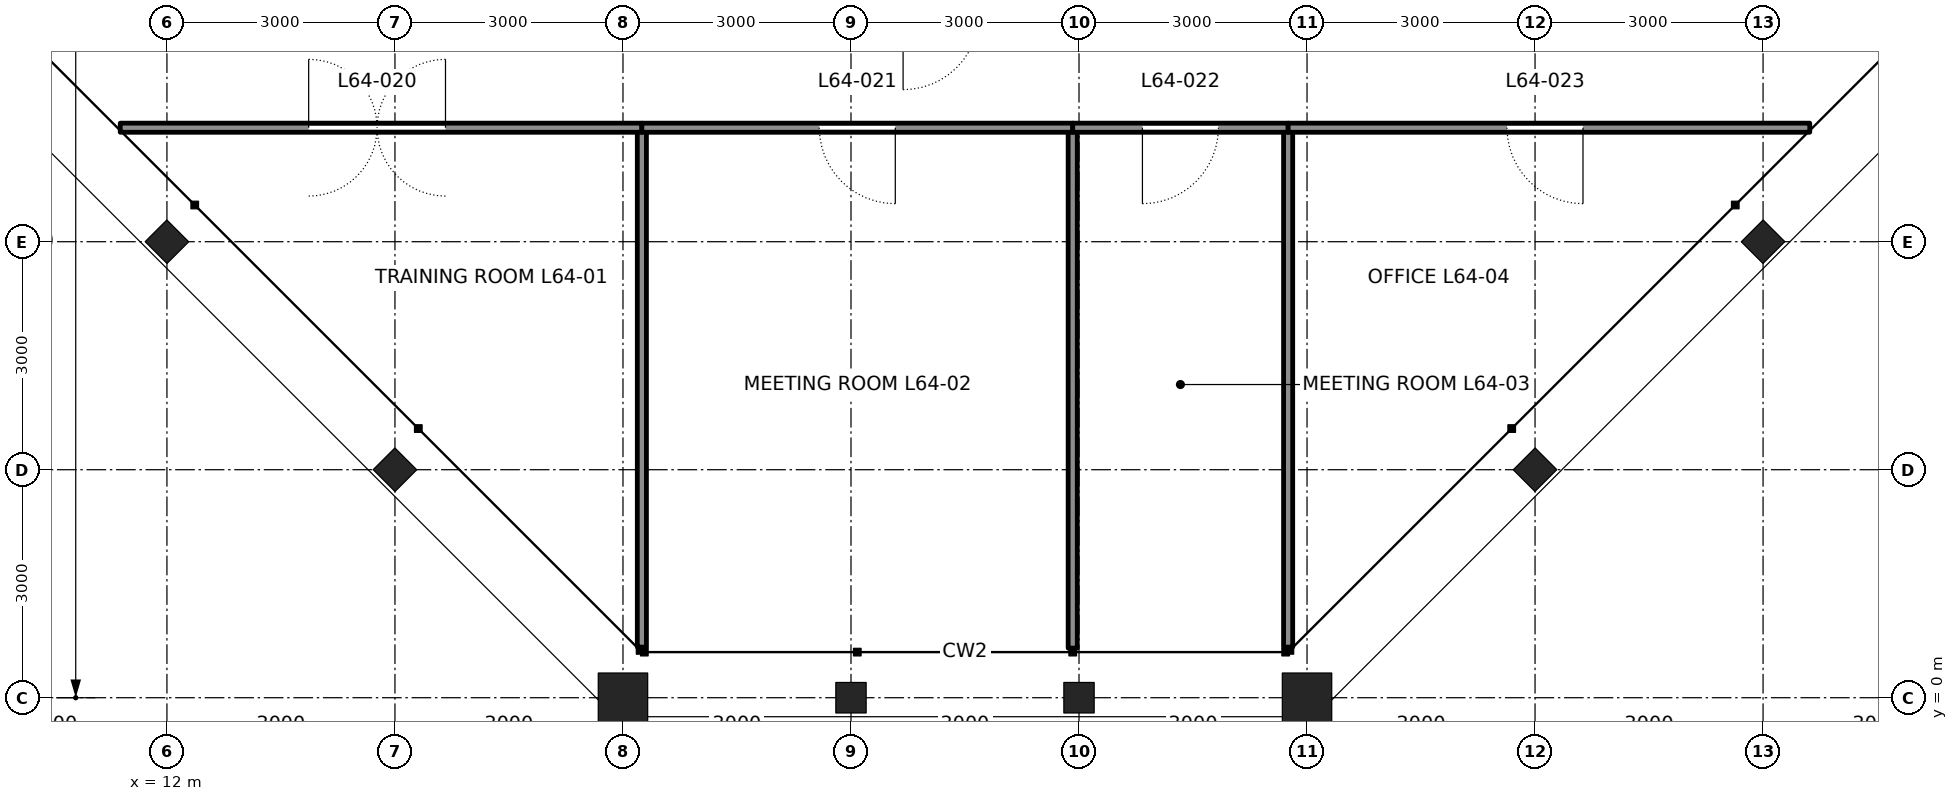
"""IFC4 building model, lengths in metres.
Left out: names, types, materials, properties, quantities, classifications, styles, units other than length and angle.
Written with IfcOpenShell. Run it as: python <this file> out.ifc"""

import sys

from ifc_helpers import new_model, si_unit, direction, frame, frame_2d, origin, origin_2d, place, context, subcontext, project, spatial, rectangle, hollow_rectangle, i_section, extrude, element, fill, save


model = new_model("IFC4")
c1 = context("Model", 3, precision=1e-05, world=origin(), true_north=direction((0.0, 1.0)))
c2 = subcontext(c1, "Body", "Model", "MODEL_VIEW")
j1 = project(units=[si_unit("LENGTHUNIT", "METRE"), si_unit("PLANEANGLEUNIT", "RADIAN")], contexts=[c1])
p1 = place(None, origin())
s1 = spatial("IfcSite", under=j1, at=p1, CompositionType="ELEMENT")
p2 = place(p1, origin())
s2 = spatial("IfcBuilding", under=s1, at=p2, CompositionType="ELEMENT")
p3 = place(p2, frame((0.0, 0.0, 287.4)))
s3 = spatial("IfcBuildingStorey", under=s2, at=p3, CompositionType="ELEMENT", Elevation=287.4)
p4 = place(p3, frame((18.0, 0.0, 0.0), z_axis=(0.0, 0.0, 1.0), x_axis=(0.0, -1.0, 0.0)))
e1 = element("IfcColumn", 1, at=p4, inside=s3, PredefinedType="COLUMN", context=c2, shape_type="SweptSolid", body=[
    extrude(hollow_rectangle(XDim=0.65, YDim=0.65, WallThickness=0.065, at=origin_2d()), origin(), (0.0, 0.0, 1.0), 4.2),
])
for number, where, z_axis, x_axis in (
    (2, (21.0, 0.0, 0.0), (0.0, 0.0, 1.0), (0.0, -1.0, 0.0)),
    (3, (24.0, 0.0, 0.0), (0.0, 0.0, 1.0), (0.0, -1.0, 0.0)),
):
    element("IfcColumn", number, at=place(p3, frame(where, z_axis=z_axis, x_axis=x_axis)), inside=s3, PredefinedType="COLUMN", context=c2, shape_type="SweptSolid", body=[
        extrude(i_section(OverallWidth=0.401, OverallDepth=0.399, WebThickness=0.025, FlangeThickness=0.04, at=origin_2d()), origin(), (0.0, 0.0, 1.0), 4.2),
    ])
p5 = place(p3, frame((27.0, 0.0, 0.0), z_axis=(0.0, 0.0, 1.0), x_axis=(0.0, -1.0, 0.0)))
e4 = element("IfcColumn", 4, at=p5, inside=s3, PredefinedType="COLUMN", context=c2, shape_type="SweptSolid", body=[
    extrude(hollow_rectangle(XDim=0.65, YDim=0.65, WallThickness=0.065, at=origin_2d()), origin(), (0.0, 0.0, 1.0), 4.2),
])
for number, where, z_axis, x_axis in (
    (5, (30.0, 3.0, 0.0), (0.0, 0.0, 1.0), (0.707, -0.707, 0.0)),
    (6, (33.0, 6.0, 0.0), (0.0, 0.0, 1.0), (0.707, -0.707, 0.0)),
    (7, (12.0, 6.0, 0.0), (0.0, 0.0, 1.0), (-0.707, -0.707, 0.0)),
    (8, (15.0, 3.0, 0.0), (0.0, 0.0, 1.0), (-0.707, -0.707, 0.0)),
):
    element("IfcColumn", number, at=place(p3, frame(where, z_axis=z_axis, x_axis=x_axis)), inside=s3, PredefinedType="COLUMN", context=c2, shape_type="SweptSolid", body=[
        extrude(i_section(OverallWidth=0.404, OverallDepth=0.406, WebThickness=0.027, FlangeThickness=0.044, at=origin_2d()), origin(), (0.0, 0.0, 1.0), 4.2),
    ])
p6 = place(p3, frame((18.249, 0.666, 0.0), z_axis=(0.0, 0.0, 1.0), x_axis=(0.0, 1.0, 0.0)))
e9 = element("IfcWall", 9, at=p6, inside=s3, PredefinedType="PARTITIONING", context=c2, shape_type="SweptSolid", body=[
    extrude(rectangle(XDim=6.834, YDim=0.12, at=frame_2d((3.417, 0.0))), origin(), (0.0, 0.0, 1.0), 4.04),
])
p7 = place(p3, frame((23.917, 0.653, 0.0), z_axis=(0.0, 0.0, 1.0), x_axis=(0.0, 1.0, 0.0)))
e10 = element("IfcWall", 10, at=p7, inside=s3, PredefinedType="PARTITIONING", context=c2, shape_type="SweptSolid", body=[
    extrude(rectangle(XDim=6.847, YDim=0.12, at=frame_2d((3.424, 0.0))), origin(), (0.0, 0.0, 1.0), 3.357),
])
p8 = place(p3, frame((26.751, 0.666, 0.0), z_axis=(0.0, 0.0, 1.0), x_axis=(0.0, 1.0, 0.0)))
e11 = element("IfcWall", 11, at=p8, inside=s3, PredefinedType="PARTITIONING", context=c2, shape_type="SweptSolid", body=[
    extrude(rectangle(XDim=6.834, YDim=0.12, at=frame_2d((3.417, 0.0))), origin(), (0.0, 0.0, 1.0), 4.04),
])
p9 = place(p3, frame((11.385, 7.5, 0.0), z_axis=(0.0, 0.0, 1.0), x_axis=(1.0, 0.0, 0.0)))
e12 = element("IfcWall", 12, at=p9, inside=s3, PredefinedType="PARTITIONING", context=c2, shape_type="SweptSolid", body=[
    extrude(rectangle(XDim=6.863, YDim=0.12, at=frame_2d((3.432, 0.0))), origin(), (0.0, 0.0, 1.0), 4.04),
])
p10 = place(p9, frame((2.479, 0.0, 0.0)))
e13 = element("IfcOpeningElement", 13, at=p10, cuts=e12, PredefinedType="OPENING", context=c2, shape_type="SweptSolid", body=[
    extrude(rectangle(XDim=1.8, YDim=2.4, at=frame_2d((0.9, 1.2))), frame((0.0, 0.07, 0.0), z_axis=(0.0, -1.0, 0.0), x_axis=(1.0, 0.0, 0.0)), (0.0, 0.0, 1.0), 0.14),
])
p11 = place(p3, frame((18.249, 7.5, 0.0), z_axis=(0.0, 0.0, 1.0), x_axis=(1.0, 0.0, 0.0)))
e14 = element("IfcWall", 14, at=p11, inside=s3, PredefinedType="PARTITIONING", context=c2, shape_type="SweptSolid", body=[
    extrude(rectangle(XDim=5.669, YDim=0.12, at=frame_2d((2.834, 0.0))), origin(), (0.0, 0.0, 1.0), 4.04),
])
p12 = place(p11, frame((2.334, 0.0, 0.0)))
e15 = element("IfcOpeningElement", 15, at=p12, cuts=e14, PredefinedType="OPENING", context=c2, shape_type="SweptSolid", body=[
    extrude(rectangle(XDim=1.0, YDim=2.4, at=frame_2d((0.5, 1.2))), frame((0.0, 0.07, 0.0), z_axis=(0.0, -1.0, 0.0), x_axis=(1.0, 0.0, 0.0)), (0.0, 0.0, 1.0), 0.14),
])
p13 = place(p3, frame((23.917, 7.5, 0.0), z_axis=(0.0, 0.0, 1.0), x_axis=(1.0, 0.0, 0.0)))
e16 = element("IfcWall", 16, at=p13, inside=s3, PredefinedType="PARTITIONING", context=c2, shape_type="SweptSolid", body=[
    extrude(rectangle(XDim=2.834, YDim=0.12, at=frame_2d((1.417, 0.0))), origin(), (0.0, 0.0, 1.0), 4.04),
])
p14 = place(p13, frame((0.917, 0.0, 0.0)))
e17 = element("IfcOpeningElement", 17, at=p14, cuts=e16, PredefinedType="OPENING", context=c2, shape_type="SweptSolid", body=[
    extrude(rectangle(XDim=1.0, YDim=2.4, at=frame_2d((0.5, 1.2))), frame((0.0, 0.07, 0.0), z_axis=(0.0, -1.0, 0.0), x_axis=(1.0, 0.0, 0.0)), (0.0, 0.0, 1.0), 0.14),
])
p15 = place(p3, frame((26.751, 7.5, 0.0), z_axis=(0.0, 0.0, 1.0), x_axis=(1.0, 0.0, 0.0)))
e18 = element("IfcWall", 18, at=p15, inside=s3, PredefinedType="PARTITIONING", context=c2, shape_type="SweptSolid", body=[
    extrude(rectangle(XDim=6.863, YDim=0.12, at=frame_2d((3.432, 0.0))), origin(), (0.0, 0.0, 1.0), 4.04),
])
p16 = place(p15, frame((2.879, 0.0, 0.0)))
e19 = element("IfcOpeningElement", 19, at=p16, cuts=e18, PredefinedType="OPENING", context=c2, shape_type="SweptSolid", body=[
    extrude(rectangle(XDim=1.0, YDim=2.4, at=frame_2d((0.5, 1.2))), frame((0.0, 0.07, 0.0), z_axis=(0.0, -1.0, 0.0), x_axis=(1.0, 0.0, 0.0)), (0.0, 0.0, 1.0), 0.14),
])
p17 = place(p10, origin())
e20 = element("IfcDoor", 20, at=p17, inside=s3, OperationType="DOUBLE_DOOR_DOUBLE_SWING", PredefinedType="DOOR", context=c2, shape_type="SweptSolid", body=[
    extrude(rectangle(XDim=1.8, YDim=2.4, at=frame_2d((0.9, 1.2))), frame((0.0, 0.025, 0.0), z_axis=(0.0, -1.0, 0.0), x_axis=(1.0, 0.0, 0.0)), (0.0, 0.0, 1.0), 0.05),
])
fill(e13, e20)
p18 = place(p12, frame((1.0, 0.0, 0.0), z_axis=(0.0, 0.0, 1.0), x_axis=(-1.0, 0.0, 0.0)))
e21 = element("IfcDoor", 21, at=p18, inside=s3, OperationType="SINGLE_SWING_LEFT", PredefinedType="DOOR", context=c2, shape_type="SweptSolid", body=[
    extrude(rectangle(XDim=1.0, YDim=2.4, at=frame_2d((0.5, 1.2))), frame((0.0, 0.025, 0.0), z_axis=(0.0, -1.0, 0.0), x_axis=(1.0, 0.0, 0.0)), (0.0, 0.0, 1.0), 0.05),
])
fill(e15, e21)
p19 = place(p14, frame((1.0, 0.0, 0.0), z_axis=(0.0, 0.0, 1.0), x_axis=(-1.0, 0.0, 0.0)))
e22 = element("IfcDoor", 22, at=p19, inside=s3, OperationType="SINGLE_SWING_RIGHT", PredefinedType="DOOR", context=c2, shape_type="SweptSolid", body=[
    extrude(rectangle(XDim=1.0, YDim=2.4, at=frame_2d((0.5, 1.2))), frame((0.0, 0.025, 0.0), z_axis=(0.0, -1.0, 0.0), x_axis=(1.0, 0.0, 0.0)), (0.0, 0.0, 1.0), 0.05),
])
fill(e17, e22)
p20 = place(p16, frame((1.0, 0.0, 0.0), z_axis=(0.0, 0.0, 1.0), x_axis=(-1.0, 0.0, 0.0)))
e23 = element("IfcDoor", 23, at=p20, inside=s3, OperationType="SINGLE_SWING_LEFT", PredefinedType="DOOR", context=c2, shape_type="SweptSolid", body=[
    extrude(rectangle(XDim=1.0, YDim=2.4, at=frame_2d((0.5, 1.2))), frame((0.0, 0.025, 0.0), z_axis=(0.0, -1.0, 0.0), x_axis=(1.0, 0.0, 0.0)), (0.0, 0.0, 1.0), 0.05),
])
fill(e19, e23)
save(model, sys.argv[1])
